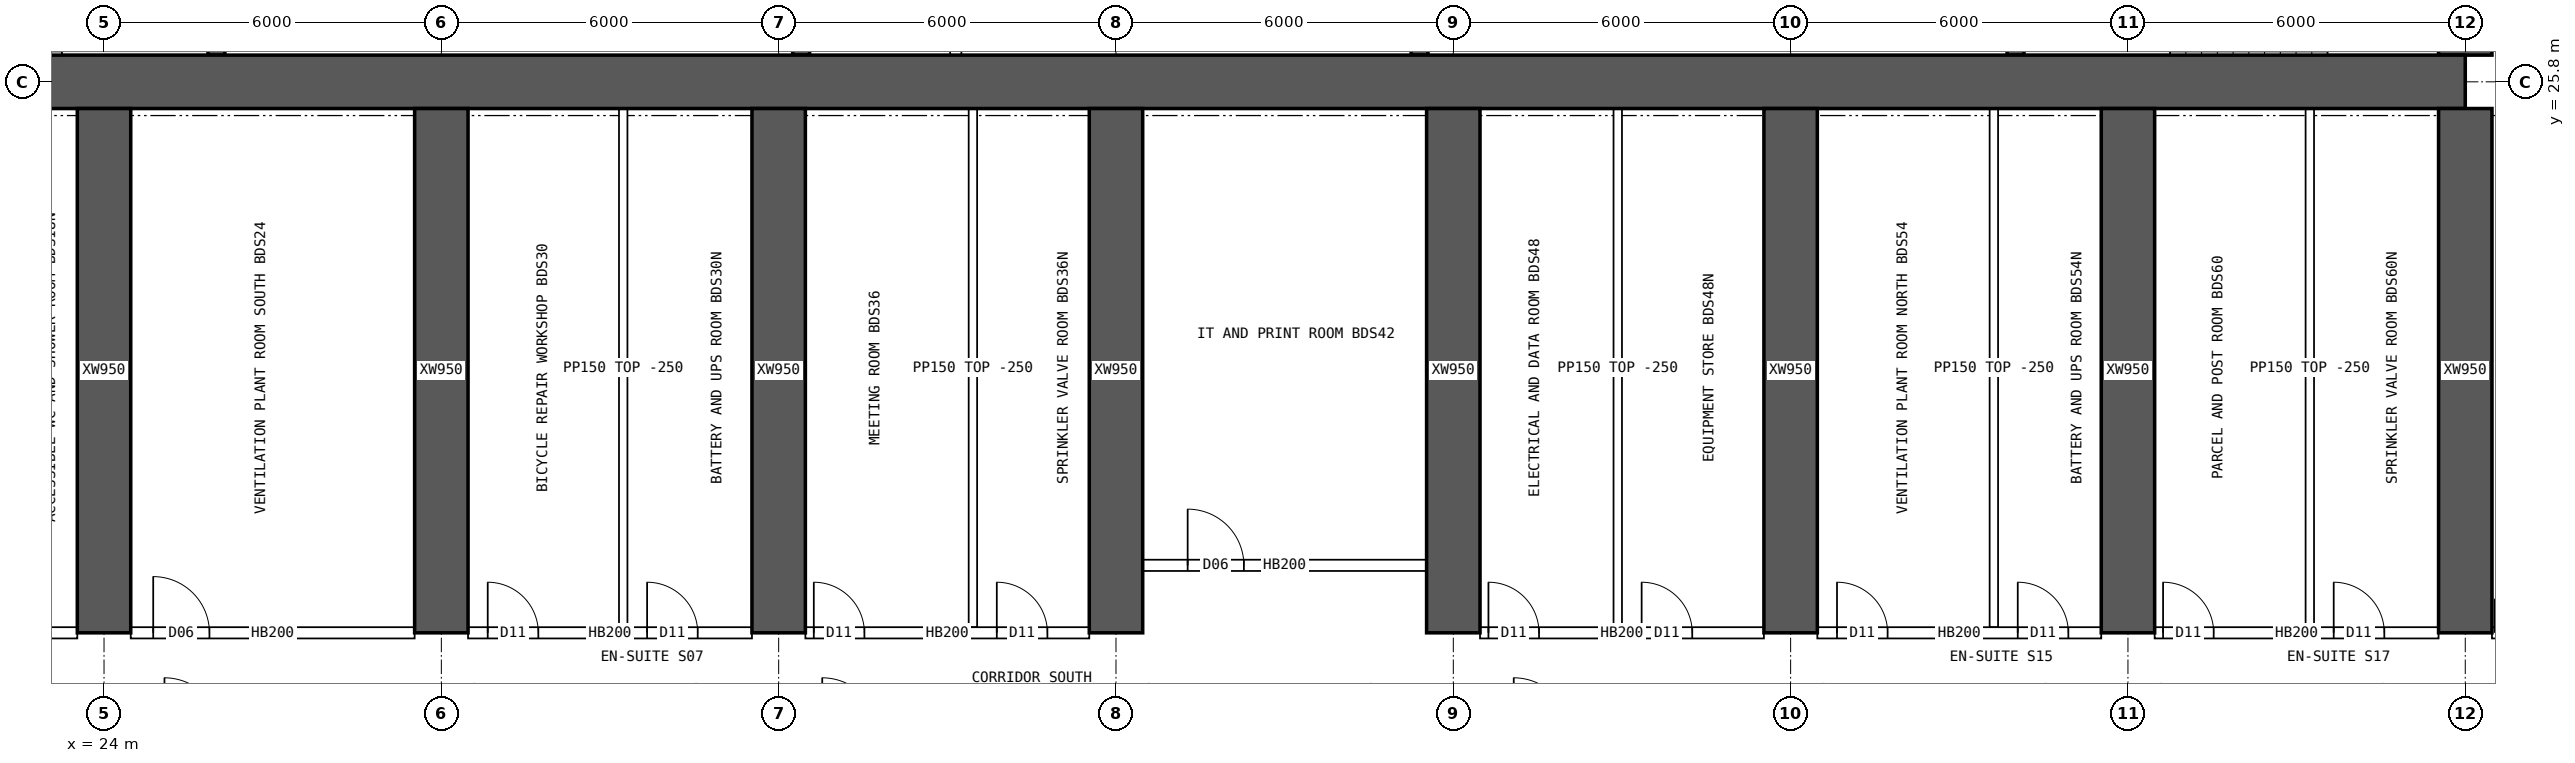
"""IFC4 building model, lengths in metres.
Left out: names, types, materials, properties, quantities, classifications, styles, units other than length and angle.
Written with IfcOpenShell. Run it as: python <this file> out.ifc"""

import sys

from ifc_helpers import new_model, si_unit, direction, frame, frame_2d, origin, place, context, subcontext, project, spatial, rectangle, extrude, element, fill, save


model = new_model("IFC4")
c1 = context("Model", 3, precision=1e-05, world=origin(), true_north=direction((0.0, 1.0)))
c2 = subcontext(c1, "Body", "Model", "MODEL_VIEW")
j1 = project(units=[si_unit("LENGTHUNIT", "METRE"), si_unit("PLANEANGLEUNIT", "RADIAN")], contexts=[c1])
p1 = place(None, origin())
s1 = spatial("IfcSite", under=j1, at=p1, CompositionType="ELEMENT")
p2 = place(p1, origin())
s2 = spatial("IfcBuilding", under=s1, at=p2, CompositionType="ELEMENT")
p3 = place(p2, frame((0.0, 0.0, 91.9)))
s3 = spatial("IfcBuildingStorey", under=s2, at=p3, CompositionType="ELEMENT", Elevation=91.9)
p4 = place(p3, frame((18.0, 25.8, 0.0), z_axis=(0.0, 0.0, 1.0), x_axis=(1.0, 0.0, 0.0)))
e1 = element("IfcWall", 1, at=p4, inside=s3, PredefinedType="SHEAR", context=c2, shape_type="SweptSolid", body=[
    extrude(rectangle(XDim=48.0, YDim=0.95, at=frame_2d((24.0, 0.0))), origin(), (0.0, 0.0, 1.0), 3.75),
])
p5 = place(p3, frame((66.0, 26.275, 0.0), z_axis=(0.0, 0.0, 1.0), x_axis=(0.0, 1.0, 0.0)))
e2 = element("IfcWall", 2, at=p5, inside=s3, PredefinedType="SHEAR", context=c2, shape_type="SweptSolid", body=[
    extrude(rectangle(XDim=11.45, YDim=0.95, at=frame_2d((5.725, 0.0))), origin(), (0.0, 0.0, 1.0), 3.75),
])
p6 = place(p5, frame((5.025, 0.0, 0.0)))
e3 = element("IfcOpeningElement", 3, at=p6, cuts=e2, PredefinedType="OPENING", context=c2, shape_type="SweptSolid", body=[
    extrude(rectangle(XDim=1.2, YDim=2.1, at=frame_2d((0.6, 1.05))), frame((0.0, 0.485, 0.0), z_axis=(0.0, -1.0, 0.0), x_axis=(1.0, 0.0, 0.0)), (0.0, 0.0, 1.0), 0.97),
])
for number, where, z_axis, x_axis in (
    (4, (26.0, 26.275, 0.0), (0.0, 0.0, 1.0), (0.0, 1.0, 0.0)),
    (5, (58.0, 26.275, 0.0), (0.0, 0.0, 1.0), (0.0, 1.0, 0.0)),
    (6, (36.4, 26.275, 0.0), (0.0, 0.0, 1.0), (0.0, 1.0, 0.0)),
    (7, (47.4, 26.275, 0.0), (0.0, 0.0, 1.0), (0.0, 1.0, 0.0)),
):
    element("IfcWall", number, at=place(p3, frame(where, z_axis=z_axis, x_axis=x_axis)), inside=s3, PredefinedType="SHEAR", context=c2, shape_type="SweptSolid", body=[
        extrude(rectangle(XDim=3.975, YDim=0.3, at=frame_2d((1.988, 0.0))), origin(), (0.0, 0.0, 1.0), 3.75),
    ])
for number, where, z_axis, x_axis in (
    (8, (24.0, 16.0, 0.0), (0.0, 0.0, 1.0), (0.0, 1.0, 0.0)),
    (9, (30.0, 16.0, 0.0), (0.0, 0.0, 1.0), (0.0, 1.0, 0.0)),
    (10, (36.0, 16.0, 0.0), (0.0, 0.0, 1.0), (0.0, 1.0, 0.0)),
    (11, (42.0, 16.0, 0.0), (0.0, 0.0, 1.0), (0.0, 1.0, 0.0)),
    (12, (48.0, 16.0, 0.0), (0.0, 0.0, 1.0), (0.0, 1.0, 0.0)),
    (13, (54.0, 16.0, 0.0), (0.0, 0.0, 1.0), (0.0, 1.0, 0.0)),
    (14, (60.0, 16.0, 0.0), (0.0, 0.0, 1.0), (0.0, 1.0, 0.0)),
    (15, (66.0, 16.0, 0.0), (0.0, 0.0, 1.0), (0.0, 1.0, 0.0)),
):
    element("IfcWall", number, at=place(p3, frame(where, z_axis=z_axis, x_axis=x_axis)), inside=s3, PredefinedType="SHEAR", context=c2, shape_type="SweptSolid", body=[
        extrude(rectangle(XDim=9.325, YDim=0.95, at=frame_2d((4.663, 0.0))), origin(), (0.0, 0.0, 1.0), 3.75),
    ])
p7 = place(p3, frame((39.15, 26.275, 0.0), z_axis=(0.0, 0.0, 1.0), x_axis=(0.0, 1.0, 0.0)))
e16 = element("IfcWall", 16, at=p7, inside=s3, PredefinedType="SOLIDWALL", context=c2, shape_type="SweptSolid", body=[
    extrude(rectangle(XDim=3.975, YDim=0.2, at=frame_2d((1.988, 0.0))), origin(), (0.0, 0.0, 1.0), 3.5),
])
p8 = place(p3, frame((18.475, 16.0, 0.0), z_axis=(0.0, 0.0, 1.0), x_axis=(1.0, 0.0, 0.0)))
e17 = element("IfcWall", 17, at=p8, inside=s3, PredefinedType="SOLIDWALL", context=c2, shape_type="SweptSolid", body=[
    extrude(rectangle(XDim=5.05, YDim=0.2, at=frame_2d((2.525, 0.0))), origin(), (0.0, 0.0, 1.0), 3.5),
])
p9 = place(p8, frame((0.35, 0.0, 0.0)))
e18 = element("IfcOpeningElement", 18, at=p9, cuts=e17, PredefinedType="OPENING", context=c2, shape_type="SweptSolid", body=[
    extrude(rectangle(XDim=0.9, YDim=2.1, at=frame_2d((0.45, 1.05))), frame((0.0, 0.11, 0.0), z_axis=(0.0, -1.0, 0.0), x_axis=(1.0, 0.0, 0.0)), (0.0, 0.0, 1.0), 0.22),
])
p10 = place(p8, frame((3.475, 0.0, 0.0)))
e19 = element("IfcOpeningElement", 19, at=p10, cuts=e17, PredefinedType="OPENING", context=c2, shape_type="SweptSolid", body=[
    extrude(rectangle(XDim=0.9, YDim=2.1, at=frame_2d((0.45, 1.05))), frame((0.0, 0.11, 0.0), z_axis=(0.0, -1.0, 0.0), x_axis=(1.0, 0.0, 0.0)), (0.0, 0.0, 1.0), 0.22),
])
p11 = place(p3, frame((24.475, 16.0, 0.0), z_axis=(0.0, 0.0, 1.0), x_axis=(1.0, 0.0, 0.0)))
e20 = element("IfcWall", 20, at=p11, inside=s3, PredefinedType="SOLIDWALL", context=c2, shape_type="SweptSolid", body=[
    extrude(rectangle(XDim=5.05, YDim=0.2, at=frame_2d((2.525, 0.0))), origin(), (0.0, 0.0, 1.0), 3.5),
])
p12 = place(p11, frame((0.4, 0.0, 0.0)))
e21 = element("IfcOpeningElement", 21, at=p12, cuts=e20, PredefinedType="OPENING", context=c2, shape_type="SweptSolid", body=[
    extrude(rectangle(XDim=1.0, YDim=2.1, at=frame_2d((0.5, 1.05))), frame((0.0, 0.11, 0.0), z_axis=(0.0, -1.0, 0.0), x_axis=(1.0, 0.0, 0.0)), (0.0, 0.0, 1.0), 0.22),
])
p13 = place(p3, frame((30.475, 16.0, 0.0), z_axis=(0.0, 0.0, 1.0), x_axis=(1.0, 0.0, 0.0)))
e22 = element("IfcWall", 22, at=p13, inside=s3, PredefinedType="SOLIDWALL", context=c2, shape_type="SweptSolid", body=[
    extrude(rectangle(XDim=5.05, YDim=0.2, at=frame_2d((2.525, 0.0))), origin(), (0.0, 0.0, 1.0), 3.5),
])
p14 = place(p13, frame((0.35, 0.0, 0.0)))
e23 = element("IfcOpeningElement", 23, at=p14, cuts=e22, PredefinedType="OPENING", context=c2, shape_type="SweptSolid", body=[
    extrude(rectangle(XDim=0.9, YDim=2.1, at=frame_2d((0.45, 1.05))), frame((0.0, 0.11, 0.0), z_axis=(0.0, -1.0, 0.0), x_axis=(1.0, 0.0, 0.0)), (0.0, 0.0, 1.0), 0.22),
])
p15 = place(p13, frame((3.185, 0.0, 0.0)))
e24 = element("IfcOpeningElement", 24, at=p15, cuts=e22, PredefinedType="OPENING", context=c2, shape_type="SweptSolid", body=[
    extrude(rectangle(XDim=0.9, YDim=2.1, at=frame_2d((0.45, 1.05))), frame((0.0, 0.11, 0.0), z_axis=(0.0, -1.0, 0.0), x_axis=(1.0, 0.0, 0.0)), (0.0, 0.0, 1.0), 0.22),
])
p16 = place(p3, frame((36.475, 16.0, 0.0), z_axis=(0.0, 0.0, 1.0), x_axis=(1.0, 0.0, 0.0)))
e25 = element("IfcWall", 25, at=p16, inside=s3, PredefinedType="SOLIDWALL", context=c2, shape_type="SweptSolid", body=[
    extrude(rectangle(XDim=5.05, YDim=0.2, at=frame_2d((2.525, 0.0))), origin(), (0.0, 0.0, 1.0), 3.5),
])
p17 = place(p16, frame((0.15, 0.0, 0.0)))
e26 = element("IfcOpeningElement", 26, at=p17, cuts=e25, PredefinedType="OPENING", context=c2, shape_type="SweptSolid", body=[
    extrude(rectangle(XDim=0.9, YDim=2.1, at=frame_2d((0.45, 1.05))), frame((0.0, 0.11, 0.0), z_axis=(0.0, -1.0, 0.0), x_axis=(1.0, 0.0, 0.0)), (0.0, 0.0, 1.0), 0.22),
])
p18 = place(p16, frame((3.405, 0.0, 0.0)))
e27 = element("IfcOpeningElement", 27, at=p18, cuts=e25, PredefinedType="OPENING", context=c2, shape_type="SweptSolid", body=[
    extrude(rectangle(XDim=0.9, YDim=2.1, at=frame_2d((0.45, 1.05))), frame((0.0, 0.11, 0.0), z_axis=(0.0, -1.0, 0.0), x_axis=(1.0, 0.0, 0.0)), (0.0, 0.0, 1.0), 0.22),
])
p19 = place(p3, frame((48.475, 16.0, 0.0), z_axis=(0.0, 0.0, 1.0), x_axis=(1.0, 0.0, 0.0)))
e28 = element("IfcWall", 28, at=p19, inside=s3, PredefinedType="SOLIDWALL", context=c2, shape_type="SweptSolid", body=[
    extrude(rectangle(XDim=5.05, YDim=0.2, at=frame_2d((2.525, 0.0))), origin(), (0.0, 0.0, 1.0), 3.5),
])
p20 = place(p19, frame((0.15, 0.0, 0.0)))
e29 = element("IfcOpeningElement", 29, at=p20, cuts=e28, PredefinedType="OPENING", context=c2, shape_type="SweptSolid", body=[
    extrude(rectangle(XDim=0.9, YDim=2.1, at=frame_2d((0.45, 1.05))), frame((0.0, 0.11, 0.0), z_axis=(0.0, -1.0, 0.0), x_axis=(1.0, 0.0, 0.0)), (0.0, 0.0, 1.0), 0.22),
])
p21 = place(p19, frame((2.875, 0.0, 0.0)))
e30 = element("IfcOpeningElement", 30, at=p21, cuts=e28, PredefinedType="OPENING", context=c2, shape_type="SweptSolid", body=[
    extrude(rectangle(XDim=0.9, YDim=2.1, at=frame_2d((0.45, 1.05))), frame((0.0, 0.11, 0.0), z_axis=(0.0, -1.0, 0.0), x_axis=(1.0, 0.0, 0.0)), (0.0, 0.0, 1.0), 0.22),
])
p22 = place(p3, frame((54.475, 16.0, 0.0), z_axis=(0.0, 0.0, 1.0), x_axis=(1.0, 0.0, 0.0)))
e31 = element("IfcWall", 31, at=p22, inside=s3, PredefinedType="SOLIDWALL", context=c2, shape_type="SweptSolid", body=[
    extrude(rectangle(XDim=5.05, YDim=0.2, at=frame_2d((2.525, 0.0))), origin(), (0.0, 0.0, 1.0), 3.5),
])
p23 = place(p22, frame((0.35, 0.0, 0.0)))
e32 = element("IfcOpeningElement", 32, at=p23, cuts=e31, PredefinedType="OPENING", context=c2, shape_type="SweptSolid", body=[
    extrude(rectangle(XDim=0.9, YDim=2.1, at=frame_2d((0.45, 1.05))), frame((0.0, 0.11, 0.0), z_axis=(0.0, -1.0, 0.0), x_axis=(1.0, 0.0, 0.0)), (0.0, 0.0, 1.0), 0.22),
])
p24 = place(p22, frame((3.565, 0.0, 0.0)))
e33 = element("IfcOpeningElement", 33, at=p24, cuts=e31, PredefinedType="OPENING", context=c2, shape_type="SweptSolid", body=[
    extrude(rectangle(XDim=0.9, YDim=2.1, at=frame_2d((0.45, 1.05))), frame((0.0, 0.11, 0.0), z_axis=(0.0, -1.0, 0.0), x_axis=(1.0, 0.0, 0.0)), (0.0, 0.0, 1.0), 0.22),
])
p25 = place(p3, frame((60.475, 16.0, 0.0), z_axis=(0.0, 0.0, 1.0), x_axis=(1.0, 0.0, 0.0)))
e34 = element("IfcWall", 34, at=p25, inside=s3, PredefinedType="SOLIDWALL", context=c2, shape_type="SweptSolid", body=[
    extrude(rectangle(XDim=5.05, YDim=0.2, at=frame_2d((2.525, 0.0))), origin(), (0.0, 0.0, 1.0), 3.5),
])
p26 = place(p25, frame((0.15, 0.0, 0.0)))
e35 = element("IfcOpeningElement", 35, at=p26, cuts=e34, PredefinedType="OPENING", context=c2, shape_type="SweptSolid", body=[
    extrude(rectangle(XDim=0.9, YDim=2.1, at=frame_2d((0.45, 1.05))), frame((0.0, 0.11, 0.0), z_axis=(0.0, -1.0, 0.0), x_axis=(1.0, 0.0, 0.0)), (0.0, 0.0, 1.0), 0.22),
])
p27 = place(p25, frame((3.185, 0.0, 0.0)))
e36 = element("IfcOpeningElement", 36, at=p27, cuts=e34, PredefinedType="OPENING", context=c2, shape_type="SweptSolid", body=[
    extrude(rectangle(XDim=0.9, YDim=2.1, at=frame_2d((0.45, 1.05))), frame((0.0, 0.11, 0.0), z_axis=(0.0, -1.0, 0.0), x_axis=(1.0, 0.0, 0.0)), (0.0, 0.0, 1.0), 0.22),
])
p28 = place(p3, frame((66.475, 16.0, 0.0), z_axis=(0.0, 0.0, 1.0), x_axis=(1.0, 0.0, 0.0)))
e37 = element("IfcWall", 37, at=p28, inside=s3, PredefinedType="SOLIDWALL", context=c2, shape_type="SweptSolid", body=[
    extrude(rectangle(XDim=1.925, YDim=0.2, at=frame_2d((0.962, 0.0))), origin(), (0.0, 0.0, 1.0), 3.5),
])
p29 = place(p28, frame((0.05, 0.0, 0.0)))
e38 = element("IfcOpeningElement", 38, at=p29, cuts=e37, PredefinedType="OPENING", context=c2, shape_type="SweptSolid", body=[
    extrude(rectangle(XDim=1.2, YDim=2.1, at=frame_2d((0.6, 1.05))), frame((0.0, 0.11, 0.0), z_axis=(0.0, -1.0, 0.0), x_axis=(1.0, 0.0, 0.0)), (0.0, 0.0, 1.0), 0.22),
])
for number, where, z_axis, x_axis in (
    (39, (33.235, 16.1, 0.0), (0.0, 0.0, 1.0), (0.0, 1.0, 0.0)),
    (40, (39.455, 16.1, 0.0), (0.0, 0.0, 1.0), (0.0, 1.0, 0.0)),
):
    element("IfcWall", number, at=place(p3, frame(where, z_axis=z_axis, x_axis=x_axis)), inside=s3, PredefinedType="PARTITIONING", context=c2, shape_type="SweptSolid", body=[
        extrude(rectangle(XDim=9.225, YDim=0.15, at=frame_2d((4.612, 0.0))), origin(), (0.0, 0.0, 1.0), 3.5),
    ])
p30 = place(p3, frame((42.475, 17.2, 0.0), z_axis=(0.0, 0.0, 1.0), x_axis=(1.0, 0.0, 0.0)))
e41 = element("IfcWall", 41, at=p30, inside=s3, PredefinedType="SOLIDWALL", context=c2, shape_type="SweptSolid", body=[
    extrude(rectangle(XDim=5.05, YDim=0.2, at=frame_2d((2.525, 0.0))), origin(), (0.0, 0.0, 1.0), 3.5),
])
p31 = place(p30, frame((0.8, 0.0, 0.0)))
e42 = element("IfcOpeningElement", 42, at=p31, cuts=e41, PredefinedType="OPENING", context=c2, shape_type="SweptSolid", body=[
    extrude(rectangle(XDim=1.0, YDim=2.1, at=frame_2d((0.5, 1.05))), frame((0.0, 0.11, 0.0), z_axis=(0.0, -1.0, 0.0), x_axis=(1.0, 0.0, 0.0)), (0.0, 0.0, 1.0), 0.22),
])
for number, where, z_axis, x_axis in (
    (43, (50.925, 16.1, 0.0), (0.0, 0.0, 1.0), (0.0, 1.0, 0.0)),
    (44, (57.615, 16.1, 0.0), (0.0, 0.0, 1.0), (0.0, 1.0, 0.0)),
    (45, (63.235, 16.1, 0.0), (0.0, 0.0, 1.0), (0.0, 1.0, 0.0)),
):
    element("IfcWall", number, at=place(p3, frame(where, z_axis=z_axis, x_axis=x_axis)), inside=s3, PredefinedType="PARTITIONING", context=c2, shape_type="SweptSolid", body=[
        extrude(rectangle(XDim=9.225, YDim=0.15, at=frame_2d((4.612, 0.0))), origin(), (0.0, 0.0, 1.0), 3.5),
    ])
p32 = place(p12, origin())
e46 = element("IfcDoor", 46, at=p32, inside=s3, OperationType="SINGLE_SWING_LEFT", PredefinedType="DOOR", context=c2, shape_type="SweptSolid", body=[
    extrude(rectangle(XDim=1.0, YDim=2.1, at=frame_2d((0.5, 1.05))), frame((0.0, 0.025, 0.0), z_axis=(0.0, -1.0, 0.0), x_axis=(1.0, 0.0, 0.0)), (0.0, 0.0, 1.0), 0.05),
])
fill(e21, e46)
p33 = place(p14, origin())
e47 = element("IfcDoor", 47, at=p33, inside=s3, OperationType="SINGLE_SWING_LEFT", PredefinedType="DOOR", context=c2, shape_type="SweptSolid", body=[
    extrude(rectangle(XDim=0.9, YDim=2.1, at=frame_2d((0.45, 1.05))), frame((0.0, 0.025, 0.0), z_axis=(0.0, -1.0, 0.0), x_axis=(1.0, 0.0, 0.0)), (0.0, 0.0, 1.0), 0.05),
])
fill(e23, e47)
p34 = place(p15, origin())
e48 = element("IfcDoor", 48, at=p34, inside=s3, OperationType="SINGLE_SWING_LEFT", PredefinedType="DOOR", context=c2, shape_type="SweptSolid", body=[
    extrude(rectangle(XDim=0.9, YDim=2.1, at=frame_2d((0.45, 1.05))), frame((0.0, 0.025, 0.0), z_axis=(0.0, -1.0, 0.0), x_axis=(1.0, 0.0, 0.0)), (0.0, 0.0, 1.0), 0.05),
])
fill(e24, e48)
p35 = place(p17, origin())
e49 = element("IfcDoor", 49, at=p35, inside=s3, OperationType="SINGLE_SWING_LEFT", PredefinedType="DOOR", context=c2, shape_type="SweptSolid", body=[
    extrude(rectangle(XDim=0.9, YDim=2.1, at=frame_2d((0.45, 1.05))), frame((0.0, 0.025, 0.0), z_axis=(0.0, -1.0, 0.0), x_axis=(1.0, 0.0, 0.0)), (0.0, 0.0, 1.0), 0.05),
])
fill(e26, e49)
p36 = place(p18, origin())
e50 = element("IfcDoor", 50, at=p36, inside=s3, OperationType="SINGLE_SWING_LEFT", PredefinedType="DOOR", context=c2, shape_type="SweptSolid", body=[
    extrude(rectangle(XDim=0.9, YDim=2.1, at=frame_2d((0.45, 1.05))), frame((0.0, 0.025, 0.0), z_axis=(0.0, -1.0, 0.0), x_axis=(1.0, 0.0, 0.0)), (0.0, 0.0, 1.0), 0.05),
])
fill(e27, e50)
p37 = place(p31, origin())
e51 = element("IfcDoor", 51, at=p37, inside=s3, OperationType="SINGLE_SWING_LEFT", PredefinedType="DOOR", context=c2, shape_type="SweptSolid", body=[
    extrude(rectangle(XDim=1.0, YDim=2.1, at=frame_2d((0.5, 1.05))), frame((0.0, 0.025, 0.0), z_axis=(0.0, -1.0, 0.0), x_axis=(1.0, 0.0, 0.0)), (0.0, 0.0, 1.0), 0.05),
])
fill(e42, e51)
p38 = place(p20, origin())
e52 = element("IfcDoor", 52, at=p38, inside=s3, OperationType="SINGLE_SWING_LEFT", PredefinedType="DOOR", context=c2, shape_type="SweptSolid", body=[
    extrude(rectangle(XDim=0.9, YDim=2.1, at=frame_2d((0.45, 1.05))), frame((0.0, 0.025, 0.0), z_axis=(0.0, -1.0, 0.0), x_axis=(1.0, 0.0, 0.0)), (0.0, 0.0, 1.0), 0.05),
])
fill(e29, e52)
p39 = place(p21, origin())
e53 = element("IfcDoor", 53, at=p39, inside=s3, OperationType="SINGLE_SWING_LEFT", PredefinedType="DOOR", context=c2, shape_type="SweptSolid", body=[
    extrude(rectangle(XDim=0.9, YDim=2.1, at=frame_2d((0.45, 1.05))), frame((0.0, 0.025, 0.0), z_axis=(0.0, -1.0, 0.0), x_axis=(1.0, 0.0, 0.0)), (0.0, 0.0, 1.0), 0.05),
])
fill(e30, e53)
p40 = place(p23, origin())
e54 = element("IfcDoor", 54, at=p40, inside=s3, OperationType="SINGLE_SWING_LEFT", PredefinedType="DOOR", context=c2, shape_type="SweptSolid", body=[
    extrude(rectangle(XDim=0.9, YDim=2.1, at=frame_2d((0.45, 1.05))), frame((0.0, 0.025, 0.0), z_axis=(0.0, -1.0, 0.0), x_axis=(1.0, 0.0, 0.0)), (0.0, 0.0, 1.0), 0.05),
])
fill(e32, e54)
p41 = place(p24, origin())
e55 = element("IfcDoor", 55, at=p41, inside=s3, OperationType="SINGLE_SWING_LEFT", PredefinedType="DOOR", context=c2, shape_type="SweptSolid", body=[
    extrude(rectangle(XDim=0.9, YDim=2.1, at=frame_2d((0.45, 1.05))), frame((0.0, 0.025, 0.0), z_axis=(0.0, -1.0, 0.0), x_axis=(1.0, 0.0, 0.0)), (0.0, 0.0, 1.0), 0.05),
])
fill(e33, e55)
p42 = place(p26, origin())
e56 = element("IfcDoor", 56, at=p42, inside=s3, OperationType="SINGLE_SWING_LEFT", PredefinedType="DOOR", context=c2, shape_type="SweptSolid", body=[
    extrude(rectangle(XDim=0.9, YDim=2.1, at=frame_2d((0.45, 1.05))), frame((0.0, 0.025, 0.0), z_axis=(0.0, -1.0, 0.0), x_axis=(1.0, 0.0, 0.0)), (0.0, 0.0, 1.0), 0.05),
])
fill(e35, e56)
p43 = place(p27, origin())
e57 = element("IfcDoor", 57, at=p43, inside=s3, OperationType="SINGLE_SWING_LEFT", PredefinedType="DOOR", context=c2, shape_type="SweptSolid", body=[
    extrude(rectangle(XDim=0.9, YDim=2.1, at=frame_2d((0.45, 1.05))), frame((0.0, 0.025, 0.0), z_axis=(0.0, -1.0, 0.0), x_axis=(1.0, 0.0, 0.0)), (0.0, 0.0, 1.0), 0.05),
])
fill(e36, e57)
save(model, sys.argv[1])
